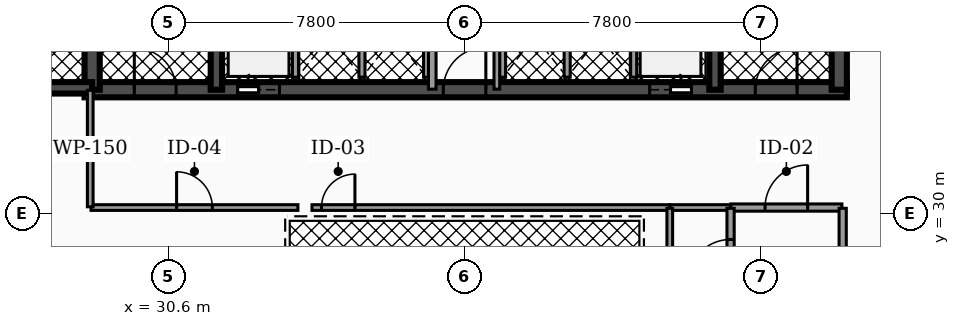
"""IFC4 building model, lengths in metres.
Left out: names, types, materials, properties, quantities, classifications, styles, units other than length and angle.
Written with IfcOpenShell. Run it as: python <this file> out.ifc"""

import sys

from ifc_helpers import new_model, si_unit, direction, frame, frame_2d, origin, place, context, subcontext, project, spatial, rectangle, extrude, element, fill, save


model = new_model("IFC4")
c1 = context("Model", 3, precision=1e-05, world=origin(), true_north=direction((0.0, 1.0)))
c2 = subcontext(c1, "Body", "Model", "MODEL_VIEW")
j1 = project(units=[si_unit("LENGTHUNIT", "METRE"), si_unit("PLANEANGLEUNIT", "RADIAN")], contexts=[c1])
p1 = place(None, origin())
s1 = spatial("IfcSite", under=j1, at=p1, CompositionType="ELEMENT")
p2 = place(p1, origin())
s2 = spatial("IfcBuilding", under=s1, at=p2, CompositionType="ELEMENT")
p3 = place(p2, frame((0.0, 0.0, 92.82)))
s3 = spatial("IfcBuildingStorey", under=s2, at=p3, CompositionType="ELEMENT", Elevation=92.82)
p4 = place(p3, frame((28.4, 33.25, 0.0), z_axis=(0.0, 0.0, 1.0), x_axis=(1.0, 0.0, 0.0)))
e1 = element("IfcWall", 1, at=p4, inside=s3, PredefinedType="SHEAR", context=c2, shape_type="SweptSolid", body=[
    extrude(rectangle(XDim=20.06, YDim=0.4, at=frame_2d((10.03, 0.0))), origin(), (0.0, 0.0, 1.0), 3.82),
])
p5 = place(p4, frame((4.03, 0.0, 0.0)))
e2 = element("IfcOpeningElement", 2, at=p5, cuts=e1, PredefinedType="OPENING", context=c2, shape_type="SweptSolid", body=[
    extrude(rectangle(XDim=1.1, YDim=2.15, at=frame_2d((0.55, 1.075))), frame((0.0, 0.21, 0.0), z_axis=(0.0, -1.0, 0.0), x_axis=(1.0, 0.0, 0.0)), (0.0, 0.0, 1.0), 0.42),
])
p6 = place(p4, frame((14.87, 0.0, 0.0)))
e3 = element("IfcOpeningElement", 3, at=p6, cuts=e1, PredefinedType="OPENING", context=c2, shape_type="SweptSolid", body=[
    extrude(rectangle(XDim=1.1, YDim=2.15, at=frame_2d((0.55, 1.075))), frame((0.0, 0.21, 0.0), z_axis=(0.0, -1.0, 0.0), x_axis=(1.0, 0.0, 0.0)), (0.0, 0.0, 1.0), 0.42),
])
p7 = place(p4, frame((1.31, 0.0, 0.0)))
e4 = element("IfcOpeningElement", 4, at=p7, cuts=e1, PredefinedType="OPENING", context=c2, shape_type="SweptSolid", body=[
    extrude(rectangle(XDim=1.1, YDim=2.2, at=frame_2d((0.55, 1.1))), frame((0.0, 0.21, 0.0), z_axis=(0.0, -1.0, 0.0), x_axis=(1.0, 0.0, 0.0)), (0.0, 0.0, 1.0), 0.42),
])
p8 = place(p4, frame((9.44, 0.0, 0.0)))
e5 = element("IfcOpeningElement", 5, at=p8, cuts=e1, PredefinedType="OPENING", context=c2, shape_type="SweptSolid", body=[
    extrude(rectangle(XDim=1.12, YDim=2.05, at=frame_2d((0.56, 1.025))), frame((0.0, 0.21, 0.0), z_axis=(0.0, -1.0, 0.0), x_axis=(1.0, 0.0, 0.0)), (0.0, 0.0, 1.0), 0.42),
])
p9 = place(p4, frame((17.65, 0.0, 0.0)))
e6 = element("IfcOpeningElement", 6, at=p9, cuts=e1, PredefinedType="OPENING", context=c2, shape_type="SweptSolid", body=[
    extrude(rectangle(XDim=1.1, YDim=2.2, at=frame_2d((0.55, 1.1))), frame((0.0, 0.21, 0.0), z_axis=(0.0, -1.0, 0.0), x_axis=(1.0, 0.0, 0.0)), (0.0, 0.0, 1.0), 0.42),
])
p10 = place(p3, frame((28.6, 33.25, 0.0), z_axis=(0.0, 0.0, 1.0), x_axis=(0.0, 1.0, 0.0)))
e7 = element("IfcWall", 7, at=p10, inside=s3, PredefinedType="SHEAR", context=c2, shape_type="SweptSolid", body=[
    extrude(rectangle(XDim=10.2, YDim=0.4, at=frame_2d((5.1, 0.0))), origin(), (0.0, 0.0, 1.0), 3.82),
])
for number, where, z_axis, x_axis in (
    (8, (31.87, 33.25, 0.0), (0.0, 0.0, 1.0), (0.0, 1.0, 0.0)),
    (9, (44.99, 33.25, 0.0), (0.0, 0.0, 1.0), (0.0, 1.0, 0.0)),
):
    element("IfcWall", number, at=place(p3, frame(where, z_axis=z_axis, x_axis=x_axis)), inside=s3, PredefinedType="SHEAR", context=c2, shape_type="SweptSolid", body=[
        extrude(rectangle(XDim=10.2, YDim=0.3, at=frame_2d((5.1, 0.0))), origin(), (0.0, 0.0, 1.0), 3.82),
    ])
p11 = place(p3, frame((48.26, 33.25, 0.0), z_axis=(0.0, 0.0, 1.0), x_axis=(0.0, 1.0, 0.0)))
e10 = element("IfcWall", 10, at=p11, inside=s3, PredefinedType="SHEAR", context=c2, shape_type="SweptSolid", body=[
    extrude(rectangle(XDim=10.2, YDim=0.4, at=frame_2d((5.1, 0.0))), origin(), (0.0, 0.0, 1.0), 3.82),
])
p12 = place(p3, frame((25.08, 33.3, 0.0), z_axis=(0.0, 0.0, 1.0), x_axis=(1.0, 0.0, 0.0)))
e11 = element("IfcWall", 11, at=p12, inside=s3, PredefinedType="SHEAR", context=c2, shape_type="SweptSolid", body=[
    extrude(rectangle(XDim=3.52, YDim=0.3, at=frame_2d((1.76, 0.0))), origin(), (0.0, 0.0, 1.0), 3.82),
])
p13 = place(p12, frame((1.335, 0.0, 0.0)))
e12 = element("IfcOpeningElement", 12, at=p13, cuts=e11, PredefinedType="OPENING", context=c2, shape_type="SweptSolid", body=[
    extrude(rectangle(XDim=0.95, YDim=2.2, at=frame_2d((0.475, 1.1))), frame((0.0, 0.16, 0.0), z_axis=(0.0, -1.0, 0.0), x_axis=(1.0, 0.0, 0.0)), (0.0, 0.0, 1.0), 0.32),
])
for number, where, z_axis, x_axis in (
    (13, (33.95, 33.58, 0.0), (0.0, 0.0, 1.0), (0.0, 1.0, 0.0)),
    (14, (42.85, 33.58, 0.0), (0.0, 0.0, 1.0), (0.0, 1.0, 0.0)),
):
    element("IfcWall", number, at=place(p3, frame(where, z_axis=z_axis, x_axis=x_axis)), inside=s3, PredefinedType="SOLIDWALL", context=c2, shape_type="SweptSolid", body=[
        extrude(rectangle(XDim=2.45, YDim=0.16, at=frame_2d((1.225, 0.0))), origin(), (0.0, 0.0, 1.0), 2.792),
    ])
for number, where, z_axis, x_axis in (
    (15, (35.7, 33.58, 0.0), (0.0, 0.0, 1.0), (0.0, 1.0, 0.0)),
    (16, (37.4, 33.58, 0.0), (0.0, 0.0, 1.0), (0.0, 1.0, 0.0)),
    (17, (39.4, 33.58, 0.0), (0.0, 0.0, 1.0), (0.0, 1.0, 0.0)),
    (18, (41.1, 33.58, 0.0), (0.0, 0.0, 1.0), (0.0, 1.0, 0.0)),
):
    element("IfcWall", number, at=place(p3, frame(where, z_axis=z_axis, x_axis=x_axis)), inside=s3, PredefinedType="SOLIDWALL", context=c2, shape_type="SweptSolid", body=[
        extrude(rectangle(XDim=2.25, YDim=0.16, at=frame_2d((1.125, 0.0))), origin(), (0.0, 0.0, 1.0), 2.792),
    ])
p14 = place(p3, frame((37.55, 33.265, 0.0), z_axis=(0.0, 0.0, 1.0), x_axis=(0.0, 1.0, 0.0)))
e19 = element("IfcWall", 19, at=p14, inside=s3, PredefinedType="PARTITIONING", context=c2, shape_type="SweptSolid", body=[
    extrude(rectangle(XDim=4.595, YDim=0.2, at=frame_2d((2.298, 0.0))), origin(), (0.0, 0.0, 1.0), 2.777),
])
p15 = place(p14, frame((3.058, 0.0, 0.0)))
e20 = element("IfcOpeningElement", 20, at=p15, cuts=e19, PredefinedType="OPENING", context=c2, shape_type="SweptSolid", body=[
    extrude(rectangle(XDim=0.88, YDim=2.05, at=frame_2d((0.44, 1.025))), frame((0.0, 0.11, 0.0), z_axis=(0.0, -1.0, 0.0), x_axis=(1.0, 0.0, 0.0)), (0.0, 0.0, 1.0), 0.22),
])
p16 = place(p3, frame((39.25, 33.265, 0.0), z_axis=(0.0, 0.0, 1.0), x_axis=(0.0, 1.0, 0.0)))
e21 = element("IfcWall", 21, at=p16, inside=s3, PredefinedType="PARTITIONING", context=c2, shape_type="SweptSolid", body=[
    extrude(rectangle(XDim=4.595, YDim=0.15, at=frame_2d((2.298, 0.0))), origin(), (0.0, 0.0, 1.0), 2.777),
])
p17 = place(p16, frame((3.028, 0.0, 0.0)))
e22 = element("IfcOpeningElement", 22, at=p17, cuts=e21, PredefinedType="OPENING", context=c2, shape_type="SweptSolid", body=[
    extrude(rectangle(XDim=0.94, YDim=2.05, at=frame_2d((0.47, 1.025))), frame((0.0, 0.085, 0.0), z_axis=(0.0, -1.0, 0.0), x_axis=(1.0, 0.0, 0.0)), (0.0, 0.0, 1.0), 0.17),
])
p18 = place(p3, frame((45.405, 30.15, 0.0), z_axis=(0.0, 0.0, 1.0), x_axis=(1.0, 0.0, 0.0)))
e23 = element("IfcWall", 23, at=p18, inside=s3, PredefinedType="PARTITIONING", context=c2, shape_type="SweptSolid", body=[
    extrude(rectangle(XDim=2.925, YDim=0.19, at=frame_2d((1.462, 0.0))), origin(), (0.0, 0.0, 1.0), 2.777),
])
p19 = place(p18, frame((0.903, 0.0, 0.0)))
e24 = element("IfcOpeningElement", 24, at=p19, cuts=e23, PredefinedType="OPENING", context=c2, shape_type="SweptSolid", body=[
    extrude(rectangle(XDim=1.12, YDim=2.05, at=frame_2d((0.56, 1.025))), frame((0.0, 0.105, 0.0), z_axis=(0.0, -1.0, 0.0), x_axis=(1.0, 0.0, 0.0)), (0.0, 0.0, 1.0), 0.21),
])
p20 = place(p3, frame((43.805, 30.15, 0.0), z_axis=(0.0, 0.0, 1.0), x_axis=(1.0, 0.0, 0.0)))
e25 = element("IfcWall", 25, at=p20, inside=s3, PredefinedType="PARTITIONING", context=c2, shape_type="SweptSolid", body=[
    extrude(rectangle(XDim=1.59, YDim=0.15, at=frame_2d((0.795, 0.0))), origin(), (0.0, 0.0, 1.0), 2.777),
])
p21 = place(p3, frame((28.57, 30.15, 0.0), z_axis=(0.0, 0.0, 1.0), x_axis=(1.0, 0.0, 0.0)))
e26 = element("IfcWall", 26, at=p21, inside=s3, PredefinedType="PARTITIONING", context=c2, shape_type="SweptSolid", body=[
    extrude(rectangle(XDim=5.445, YDim=0.15, at=frame_2d((2.722, 0.0))), origin(), (0.0, 0.0, 1.0), 2.777),
])
p22 = place(p21, frame((2.252, 0.0, 0.0)))
e27 = element("IfcOpeningElement", 27, at=p22, cuts=e26, PredefinedType="OPENING", context=c2, shape_type="SweptSolid", body=[
    extrude(rectangle(XDim=0.94, YDim=2.05, at=frame_2d((0.47, 1.025))), frame((0.0, 0.085, 0.0), z_axis=(0.0, -1.0, 0.0), x_axis=(1.0, 0.0, 0.0)), (0.0, 0.0, 1.0), 0.17),
])
p23 = place(p3, frame((28.55, 30.17, 0.0), z_axis=(0.0, 0.0, 1.0), x_axis=(0.0, 1.0, 0.0)))
e28 = element("IfcWall", 28, at=p23, inside=s3, PredefinedType="PARTITIONING", context=c2, shape_type="SweptSolid", body=[
    extrude(rectangle(XDim=3.065, YDim=0.15, at=frame_2d((1.533, 0.0))), origin(), (0.0, 0.0, 1.0), 2.777),
])
p24 = place(p3, frame((34.385, 30.15, 0.0), z_axis=(0.0, 0.0, 1.0), x_axis=(1.0, 0.0, 0.0)))
e29 = element("IfcWall", 29, at=p24, inside=s3, PredefinedType="PARTITIONING", context=c2, shape_type="SweptSolid", body=[
    extrude(rectangle(XDim=9.41, YDim=0.15, at=frame_2d((4.705, 0.0))), origin(), (0.0, 0.0, 1.0), 2.777),
])
p25 = place(p24, frame((0.25, 0.0, 0.0)))
e30 = element("IfcOpeningElement", 30, at=p25, cuts=e29, PredefinedType="OPENING", context=c2, shape_type="SweptSolid", body=[
    extrude(rectangle(XDim=0.88, YDim=2.05, at=frame_2d((0.44, 1.025))), frame((0.0, 0.085, 0.0), z_axis=(0.0, -1.0, 0.0), x_axis=(1.0, 0.0, 0.0)), (0.0, 0.0, 1.0), 0.17),
])
p26 = place(p3, frame((45.4, 27.37, 0.0), z_axis=(0.0, 0.0, 1.0), x_axis=(0.0, 1.0, 0.0)))
e31 = element("IfcWall", 31, at=p26, inside=s3, PredefinedType="PARTITIONING", context=c2, shape_type="SweptSolid", body=[
    extrude(rectangle(XDim=2.76, YDim=0.19, at=frame_2d((1.38, 0.0))), origin(), (0.0, 0.0, 1.0), 2.777),
])
p27 = place(p26, frame((0.82, 0.0, 0.0)))
e32 = element("IfcOpeningElement", 32, at=p27, cuts=e31, PredefinedType="OPENING", context=c2, shape_type="SweptSolid", body=[
    extrude(rectangle(XDim=1.12, YDim=2.05, at=frame_2d((0.56, 1.025))), frame((0.0, 0.105, 0.0), z_axis=(0.0, -1.0, 0.0), x_axis=(1.0, 0.0, 0.0)), (0.0, 0.0, 1.0), 0.21),
])
p28 = place(p3, frame((48.35, 27.37, 0.0), z_axis=(0.0, 0.0, 1.0), x_axis=(0.0, 1.0, 0.0)))
e33 = element("IfcWall", 33, at=p28, inside=s3, PredefinedType="PARTITIONING", context=c2, shape_type="SweptSolid", body=[
    extrude(rectangle(XDim=2.76, YDim=0.19, at=frame_2d((1.38, 0.0))), origin(), (0.0, 0.0, 1.0), 2.777),
])
p29 = place(p3, frame((43.8, 23.62, 0.0), z_axis=(0.0, 0.0, 1.0), x_axis=(0.0, 1.0, 0.0)))
e34 = element("IfcWall", 34, at=p29, inside=s3, PredefinedType="PARTITIONING", context=c2, shape_type="SweptSolid", body=[
    extrude(rectangle(XDim=6.51, YDim=0.15, at=frame_2d((3.255, 0.0))), origin(), (0.0, 0.0, 1.0), 2.777),
])
p30 = place(p5, origin())
e35 = element("IfcDoor", 35, at=p30, inside=s3, OperationType="SLIDING_TO_LEFT", PredefinedType="DOOR", context=c2, shape_type="SweptSolid", body=[
    extrude(rectangle(XDim=1.1, YDim=2.15, at=frame_2d((0.55, 1.075))), frame((0.0, 0.025, 0.0), z_axis=(0.0, -1.0, 0.0), x_axis=(1.0, 0.0, 0.0)), (0.0, 0.0, 1.0), 0.05),
])
fill(e2, e35)
p31 = place(p6, origin())
e36 = element("IfcDoor", 36, at=p31, inside=s3, OperationType="SLIDING_TO_RIGHT", PredefinedType="DOOR", context=c2, shape_type="SweptSolid", body=[
    extrude(rectangle(XDim=1.1, YDim=2.15, at=frame_2d((0.55, 1.075))), frame((0.0, 0.025, 0.0), z_axis=(0.0, -1.0, 0.0), x_axis=(1.0, 0.0, 0.0)), (0.0, 0.0, 1.0), 0.05),
])
fill(e3, e36)
p32 = place(p7, origin())
e37 = element("IfcDoor", 37, at=p32, inside=s3, OperationType="SINGLE_SWING_LEFT", PredefinedType="DOOR", context=c2, shape_type="SweptSolid", body=[
    extrude(rectangle(XDim=1.1, YDim=2.2, at=frame_2d((0.55, 1.1))), frame((0.0, 0.025, 0.0), z_axis=(0.0, -1.0, 0.0), x_axis=(1.0, 0.0, 0.0)), (0.0, 0.0, 1.0), 0.05),
])
fill(e4, e37)
p33 = place(p8, origin())
e38 = element("IfcDoor", 38, at=p33, inside=s3, OperationType="SINGLE_SWING_RIGHT", PredefinedType="DOOR", context=c2, shape_type="SweptSolid", body=[
    extrude(rectangle(XDim=1.12, YDim=2.05, at=frame_2d((0.56, 1.025))), frame((0.0, 0.025, 0.0), z_axis=(0.0, -1.0, 0.0), x_axis=(1.0, 0.0, 0.0)), (0.0, 0.0, 1.0), 0.05),
])
fill(e5, e38)
p34 = place(p9, origin())
e39 = element("IfcDoor", 39, at=p34, inside=s3, OperationType="SINGLE_SWING_RIGHT", PredefinedType="DOOR", context=c2, shape_type="SweptSolid", body=[
    extrude(rectangle(XDim=1.1, YDim=2.2, at=frame_2d((0.55, 1.1))), frame((0.0, 0.025, 0.0), z_axis=(0.0, -1.0, 0.0), x_axis=(1.0, 0.0, 0.0)), (0.0, 0.0, 1.0), 0.05),
])
fill(e6, e39)
p35 = place(p19, origin())
e40 = element("IfcDoor", 40, at=p35, inside=s3, OperationType="SINGLE_SWING_RIGHT", PredefinedType="DOOR", context=c2, shape_type="SweptSolid", body=[
    extrude(rectangle(XDim=1.12, YDim=2.05, at=frame_2d((0.56, 1.025))), frame((0.0, 0.025, 0.0), z_axis=(0.0, -1.0, 0.0), x_axis=(1.0, 0.0, 0.0)), (0.0, 0.0, 1.0), 0.05),
])
fill(e24, e40)
p36 = place(p22, origin())
e41 = element("IfcDoor", 41, at=p36, inside=s3, OperationType="SINGLE_SWING_LEFT", PredefinedType="DOOR", context=c2, shape_type="SweptSolid", body=[
    extrude(rectangle(XDim=0.94, YDim=2.05, at=frame_2d((0.47, 1.025))), frame((0.0, 0.025, 0.0), z_axis=(0.0, -1.0, 0.0), x_axis=(1.0, 0.0, 0.0)), (0.0, 0.0, 1.0), 0.05),
])
fill(e27, e41)
p37 = place(p25, origin())
e42 = element("IfcDoor", 42, at=p37, inside=s3, OperationType="SINGLE_SWING_RIGHT", PredefinedType="DOOR", context=c2, shape_type="SweptSolid", body=[
    extrude(rectangle(XDim=0.88, YDim=2.05, at=frame_2d((0.44, 1.025))), frame((0.0, 0.025, 0.0), z_axis=(0.0, -1.0, 0.0), x_axis=(1.0, 0.0, 0.0)), (0.0, 0.0, 1.0), 0.05),
])
fill(e30, e42)
p38 = place(p27, origin())
e43 = element("IfcDoor", 43, at=p38, inside=s3, OperationType="SINGLE_SWING_LEFT", PredefinedType="DOOR", context=c2, shape_type="SweptSolid", body=[
    extrude(rectangle(XDim=1.12, YDim=2.05, at=frame_2d((0.56, 1.025))), frame((0.0, 0.025, 0.0), z_axis=(0.0, -1.0, 0.0), x_axis=(1.0, 0.0, 0.0)), (0.0, 0.0, 1.0), 0.05),
])
fill(e32, e43)
save(model, sys.argv[1])
